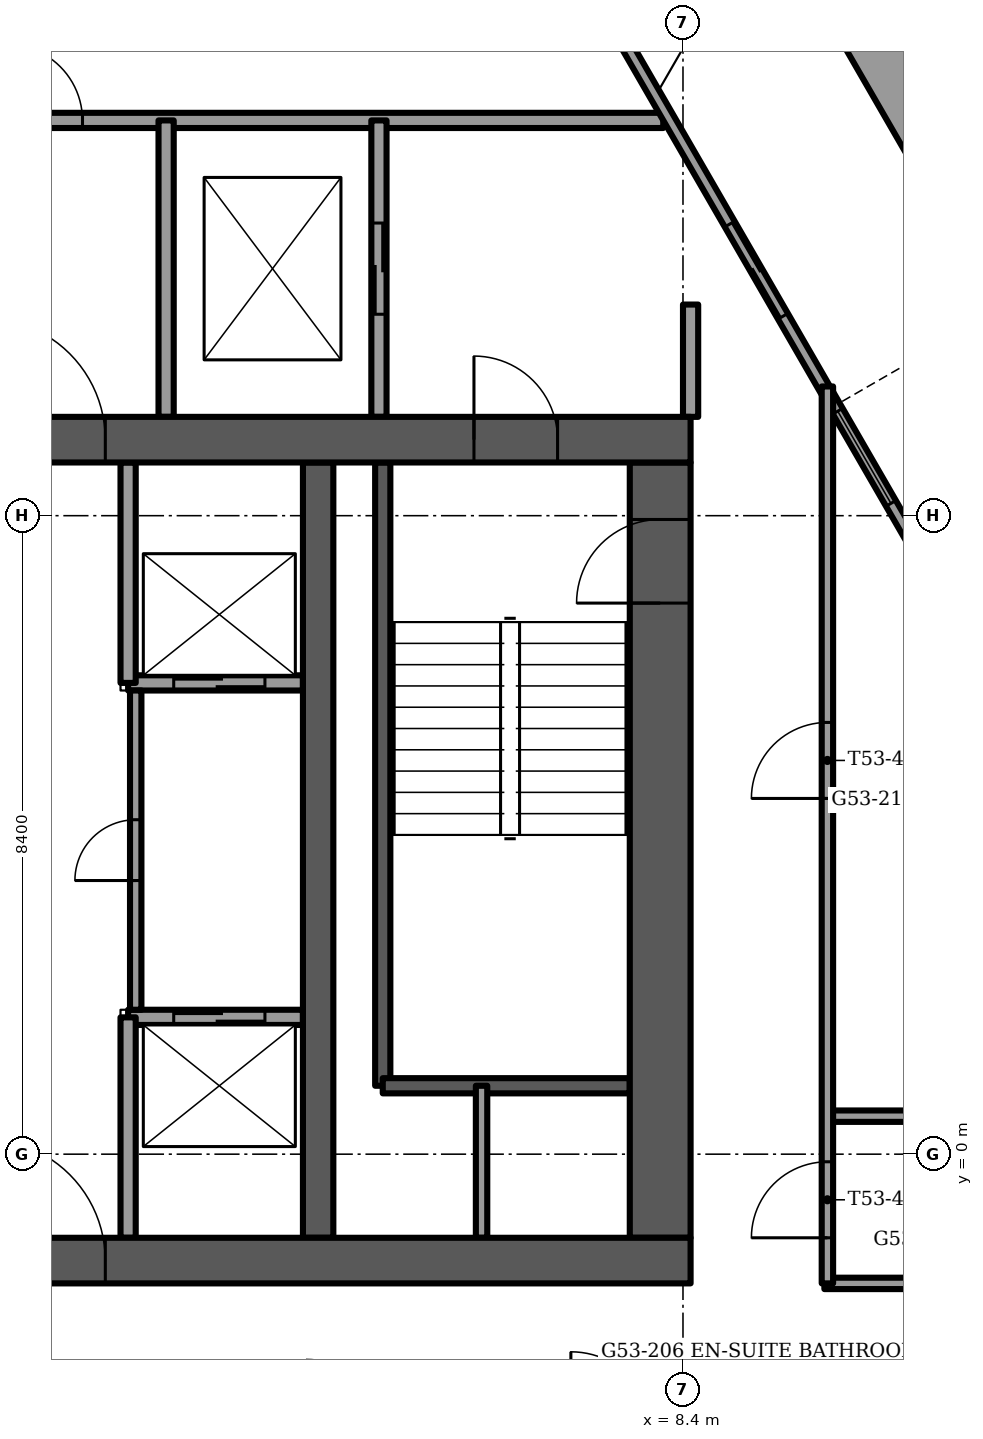
"""IFC4 building model, lengths in metres.
Left out: names, types, materials, properties, quantities, classifications, styles, units other than length and angle.
Written with IfcOpenShell. Run it as: python <this file> out.ifc"""

import sys

from ifc_helpers import new_model, si_unit, direction, frame, frame_2d, origin, place, context, subcontext, project, spatial, rectangle, extrude, element, fill, save


model = new_model("IFC4")
c1 = context("Model", 3, precision=1e-05, world=origin(), true_north=direction((0.0, 1.0)))
c2 = subcontext(c1, "Body", "Model", "MODEL_VIEW")
j1 = project(units=[si_unit("LENGTHUNIT", "METRE"), si_unit("PLANEANGLEUNIT", "RADIAN")], contexts=[c1])
p1 = place(None, origin())
s1 = spatial("IfcSite", under=j1, at=p1, CompositionType="ELEMENT")
p2 = place(p1, origin())
s2 = spatial("IfcBuilding", under=s1, at=p2, CompositionType="ELEMENT")
p3 = place(p2, frame((0.0, 0.0, 214.5)))
s3 = spatial("IfcBuildingStorey", under=s2, at=p3, CompositionType="ELEMENT", Elevation=214.5)
p4 = place(p3, frame((-8.5, -1.4, -0.3), z_axis=(0.0, 0.0, 1.0), x_axis=(1.0, 0.0, 0.0)))
e1 = element("IfcWall", 1, at=p4, inside=s3, PredefinedType="SHEAR", context=c2, shape_type="SweptSolid", body=[
    extrude(rectangle(XDim=17.0, YDim=0.6, at=frame_2d((8.5, 0.0))), origin(), (0.0, 0.0, 1.0), 3.75),
])
p5 = place(p4, frame((7.7, 0.0, 0.0)))
e2 = element("IfcOpeningElement", 2, at=p5, cuts=e1, PredefinedType="OPENING", context=c2, shape_type="SweptSolid", body=[
    extrude(rectangle(XDim=1.6, YDim=2.1, at=frame_2d((0.8, 1.05))), frame((0.0, 0.3, 0.0), z_axis=(0.0, -1.0, 0.0), x_axis=(1.0, 0.0, 0.0)), (0.0, 0.0, 1.0), 0.6),
])
p6 = place(p3, frame((-8.5, 9.4, -0.3), z_axis=(0.0, 0.0, 1.0), x_axis=(1.0, 0.0, 0.0)))
e3 = element("IfcWall", 3, at=p6, inside=s3, PredefinedType="SHEAR", context=c2, shape_type="SweptSolid", body=[
    extrude(rectangle(XDim=17.0, YDim=0.6, at=frame_2d((8.5, 0.0))), origin(), (0.0, 0.0, 1.0), 3.75),
])
p7 = place(p6, frame((7.7, 0.0, 0.0)))
e4 = element("IfcOpeningElement", 4, at=p7, cuts=e3, PredefinedType="OPENING", context=c2, shape_type="SweptSolid", body=[
    extrude(rectangle(XDim=1.6, YDim=2.1, at=frame_2d((0.8, 1.05))), frame((0.0, 0.3, 0.0), z_axis=(0.0, -1.0, 0.0), x_axis=(1.0, 0.0, 0.0)), (0.0, 0.0, 1.0), 0.6),
])
p8 = place(p6, frame((1.75, 0.0, 0.0)))
e5 = element("IfcOpeningElement", 5, at=p8, cuts=e3, PredefinedType="OPENING", context=c2, shape_type="SweptSolid", body=[
    extrude(rectangle(XDim=1.1, YDim=2.1, at=frame_2d((0.55, 1.05))), frame((0.0, 0.3, 0.0), z_axis=(0.0, -1.0, 0.0), x_axis=(1.0, 0.0, 0.0)), (0.0, 0.0, 1.0), 0.6),
])
p9 = place(p6, frame((14.15, 0.0, 0.0)))
e6 = element("IfcOpeningElement", 6, at=p9, cuts=e3, PredefinedType="OPENING", context=c2, shape_type="SweptSolid", body=[
    extrude(rectangle(XDim=1.1, YDim=2.1, at=frame_2d((0.55, 1.05))), frame((0.0, 0.3, 0.0), z_axis=(0.0, -1.0, 0.0), x_axis=(1.0, 0.0, 0.0)), (0.0, 0.0, 1.0), 0.6),
])
p10 = place(p3, frame((8.1, -1.1, -0.3), z_axis=(0.0, 0.0, 1.0), x_axis=(0.0, 1.0, 0.0)))
e7 = element("IfcWall", 7, at=p10, inside=s3, PredefinedType="SHEAR", context=c2, shape_type="SweptSolid", body=[
    extrude(rectangle(XDim=10.2, YDim=0.8, at=frame_2d((5.1, 0.0))), origin(), (0.0, 0.0, 1.0), 3.75),
])
p11 = place(p10, frame((8.35, 0.0, 0.0)))
e8 = element("IfcOpeningElement", 8, at=p11, cuts=e7, PredefinedType="OPENING", context=c2, shape_type="SweptSolid", body=[
    extrude(rectangle(XDim=1.1, YDim=2.1, at=frame_2d((0.55, 1.05))), frame((0.0, 0.4, 0.0), z_axis=(0.0, -1.0, 0.0), x_axis=(1.0, 0.0, 0.0)), (0.0, 0.0, 1.0), 0.8),
])
p12 = place(p3, frame((3.6, -1.1, -0.3), z_axis=(0.0, 0.0, 1.0), x_axis=(0.0, 1.0, 0.0)))
e9 = element("IfcWall", 9, at=p12, inside=s3, PredefinedType="SHEAR", context=c2, shape_type="SweptSolid", body=[
    extrude(rectangle(XDim=10.2, YDim=0.4, at=frame_2d((5.1, 0.0))), origin(), (0.0, 0.0, 1.0), 3.75),
])
p13 = place(p3, frame((12.718, 11.672, 0.0), z_axis=(0.0, 0.0, 1.0), x_axis=(-0.50000722722, 0.866021231107, 0.0)))
e10 = element("IfcWall", 10, at=p13, inside=s3, PredefinedType="PARAPET", context=c2, shape_type="SweptSolid", body=[
    extrude(rectangle(XDim=5.492, YDim=0.9, at=frame_2d((2.746, 0.0))), origin(), (0.0, 0.0, 1.0), 1.1),
])
p14 = place(p3, frame((8.347, -13.393, 0.0), z_axis=(0.0, 0.0, 1.0), x_axis=(0.500000919504, 0.866024872908, 0.0)))
e11 = element("IfcWall", 11, at=p14, inside=s3, PredefinedType="SOLIDWALL", context=c2, shape_type="SweptSolid", body=[
    extrude(rectangle(XDim=14.85, YDim=0.15, at=frame_2d((7.425, 0.0))), origin(), (0.0, 0.0, 1.0), 3.45),
])
p15 = place(p14, frame((3.525, 0.0, 0.15)))
e12 = element("IfcOpeningElement", 12, at=p15, cuts=e11, PredefinedType="OPENING", context=c2, shape_type="SweptSolid", body=[
    extrude(rectangle(XDim=1.5, YDim=2.85, at=frame_2d((0.75, 1.425))), frame((0.0, 0.075, 0.0), z_axis=(0.0, -1.0, 0.0), x_axis=(1.0, 0.0, 0.0)), (0.0, 0.0, 1.0), 0.15),
])
p16 = place(p14, frame((5.725, 0.0, 0.0)))
e13 = element("IfcOpeningElement", 13, at=p16, cuts=e11, PredefinedType="OPENING", context=c2, shape_type="SweptSolid", body=[
    extrude(rectangle(XDim=1.4, YDim=2.4, at=frame_2d((0.7, 1.2))), frame((0.0, 0.075, 0.0), z_axis=(0.0, -1.0, 0.0), x_axis=(1.0, 0.0, 0.0)), (0.0, 0.0, 1.0), 0.15),
])
p17 = place(p14, frame((9.078, 0.0, 0.15)))
e14 = element("IfcOpeningElement", 14, at=p17, cuts=e11, PredefinedType="OPENING", context=c2, shape_type="SweptSolid", body=[
    extrude(rectangle(XDim=1.4, YDim=2.85, at=frame_2d((0.7, 1.425))), frame((0.0, 0.075, 0.0), z_axis=(0.0, -1.0, 0.0), x_axis=(1.0, 0.0, 0.0)), (0.0, 0.0, 1.0), 0.15),
])
p18 = place(p14, frame((0.318, 0.0, 0.15)))
e15 = element("IfcOpeningElement", 15, at=p18, cuts=e11, PredefinedType="OPENING", context=c2, shape_type="SweptSolid", body=[
    extrude(rectangle(XDim=0.9, YDim=2.73, at=frame_2d((0.45, 1.365))), frame((0.0, 0.075, 0.0), z_axis=(0.0, -1.0, 0.0), x_axis=(1.0, 0.0, 0.0)), (0.0, 0.0, 1.0), 0.15),
])
p19 = place(p14, frame((12.537, 0.0, 0.15)))
e16 = element("IfcOpeningElement", 16, at=p19, cuts=e11, PredefinedType="OPENING", context=c2, shape_type="SweptSolid", body=[
    extrude(rectangle(XDim=1.5, YDim=2.73, at=frame_2d((0.75, 1.365))), frame((0.0, 0.075, 0.0), z_axis=(0.0, -1.0, 0.0), x_axis=(1.0, 0.0, 0.0)), (0.0, 0.0, 1.0), 0.15),
])
p20 = place(p3, frame((15.772, 0.532, 0.0), z_axis=(0.0, 0.0, 1.0), x_axis=(-0.49999710518, 0.866027075103, 0.0)))
e17 = element("IfcWall", 17, at=p20, inside=s3, PredefinedType="SOLIDWALL", context=c2, shape_type="SweptSolid", body=[
    extrude(rectangle(XDim=17.621, YDim=0.15, at=frame_2d((8.81, 0.0))), origin(), (0.0, 0.0, 1.0), 3.45),
])
p21 = place(p20, frame((3.525, 0.0, 0.15)))
e18 = element("IfcOpeningElement", 18, at=p21, cuts=e17, PredefinedType="OPENING", context=c2, shape_type="SweptSolid", body=[
    extrude(rectangle(XDim=1.5, YDim=2.85, at=frame_2d((0.75, 1.425))), frame((0.0, 0.075, 0.0), z_axis=(0.0, -1.0, 0.0), x_axis=(1.0, 0.0, 0.0)), (0.0, 0.0, 1.0), 0.15),
])
p22 = place(p20, frame((5.725, 0.0, 0.15)))
e19 = element("IfcOpeningElement", 19, at=p22, cuts=e17, PredefinedType="OPENING", context=c2, shape_type="SweptSolid", body=[
    extrude(rectangle(XDim=1.4, YDim=2.85, at=frame_2d((0.7, 1.425))), frame((0.0, 0.075, 0.0), z_axis=(0.0, -1.0, 0.0), x_axis=(1.0, 0.0, 0.0)), (0.0, 0.0, 1.0), 0.15),
])
p23 = place(p20, frame((7.725, 0.0, 0.15)))
e20 = element("IfcOpeningElement", 20, at=p23, cuts=e17, PredefinedType="OPENING", context=c2, shape_type="SweptSolid", body=[
    extrude(rectangle(XDim=0.9, YDim=2.85, at=frame_2d((0.45, 1.425))), frame((0.0, 0.075, 0.0), z_axis=(0.0, -1.0, 0.0), x_axis=(1.0, 0.0, 0.0)), (0.0, 0.0, 1.0), 0.15),
])
p24 = place(p20, frame((9.271, 0.0, 0.15)))
e21 = element("IfcOpeningElement", 21, at=p24, cuts=e17, PredefinedType="OPENING", context=c2, shape_type="SweptSolid", body=[
    extrude(rectangle(XDim=1.4, YDim=2.85, at=frame_2d((0.7, 1.425))), frame((0.0, 0.075, 0.0), z_axis=(0.0, -1.0, 0.0), x_axis=(1.0, 0.0, 0.0)), (0.0, 0.0, 1.0), 0.15),
])
p25 = place(p20, frame((12.114, 0.0, 0.0)))
e22 = element("IfcOpeningElement", 22, at=p25, cuts=e17, PredefinedType="OPENING", context=c2, shape_type="SweptSolid", body=[
    extrude(rectangle(XDim=1.4, YDim=2.4, at=frame_2d((0.7, 1.2))), frame((0.0, 0.075, 0.0), z_axis=(0.0, -1.0, 0.0), x_axis=(1.0, 0.0, 0.0)), (0.0, 0.0, 1.0), 0.15),
])
p26 = place(p20, frame((0.894, 0.0, 0.15)))
e23 = element("IfcOpeningElement", 23, at=p26, cuts=e17, PredefinedType="OPENING", context=c2, shape_type="SweptSolid", body=[
    extrude(rectangle(XDim=1.5, YDim=2.73, at=frame_2d((0.75, 1.365))), frame((0.0, 0.075, 0.0), z_axis=(0.0, -1.0, 0.0), x_axis=(1.0, 0.0, 0.0)), (0.0, 0.0, 1.0), 0.15),
])
p27 = place(p20, frame((16.323, 0.0, 0.15)))
e24 = element("IfcOpeningElement", 24, at=p27, cuts=e17, PredefinedType="OPENING", context=c2, shape_type="SweptSolid", body=[
    extrude(rectangle(XDim=0.9, YDim=2.73, at=frame_2d((0.45, 1.365))), frame((0.0, 0.075, 0.0), z_axis=(0.0, -1.0, 0.0), x_axis=(1.0, 0.0, 0.0)), (0.0, 0.0, 1.0), 0.15),
])
p28 = place(p3, frame((1.1, 1.8, 0.0), z_axis=(0.0, 0.0, 1.0), x_axis=(1.0, 0.0, 0.0)))
e25 = element("IfcWall", 25, at=p28, inside=s3, PredefinedType="PARTITIONING", context=c2, shape_type="SweptSolid", body=[
    extrude(rectangle(XDim=2.3, YDim=0.2, at=frame_2d((1.15, 0.0))), origin(), (0.0, 0.0, 1.0), 3.45),
])
p29 = place(p28, frame((0.6, 0.0, 0.0)))
e26 = element("IfcOpeningElement", 26, at=p29, cuts=e25, PredefinedType="OPENING", context=c2, shape_type="SweptSolid", body=[
    extrude(rectangle(XDim=1.2, YDim=2.1, at=frame_2d((0.6, 1.05))), frame((0.0, 0.1, 0.0), z_axis=(0.0, -1.0, 0.0), x_axis=(1.0, 0.0, 0.0)), (0.0, 0.0, 1.0), 0.2),
])
p30 = place(p3, frame((1.1, 6.2, 0.0), z_axis=(0.0, 0.0, 1.0), x_axis=(1.0, 0.0, 0.0)))
e27 = element("IfcWall", 27, at=p30, inside=s3, PredefinedType="PARTITIONING", context=c2, shape_type="SweptSolid", body=[
    extrude(rectangle(XDim=2.3, YDim=0.2, at=frame_2d((1.15, 0.0))), origin(), (0.0, 0.0, 1.0), 3.45),
])
p31 = place(p30, frame((0.6, 0.0, 0.0)))
e28 = element("IfcOpeningElement", 28, at=p31, cuts=e27, PredefinedType="OPENING", context=c2, shape_type="SweptSolid", body=[
    extrude(rectangle(XDim=1.2, YDim=2.1, at=frame_2d((0.6, 1.05))), frame((0.0, 0.1, 0.0), z_axis=(0.0, -1.0, 0.0), x_axis=(1.0, 0.0, 0.0)), (0.0, 0.0, 1.0), 0.2),
])
for number, where, z_axis, x_axis in (
    (29, (1.1, -1.1, 0.0), (0.0, 0.0, 1.0), (0.0, 1.0, 0.0)),
    (30, (1.1, 6.2, 0.0), (0.0, 0.0, 1.0), (0.0, 1.0, 0.0)),
):
    element("IfcWall", number, at=place(p3, frame(where, z_axis=z_axis, x_axis=x_axis)), inside=s3, PredefinedType="PARTITIONING", context=c2, shape_type="SweptSolid", body=[
        extrude(rectangle(XDim=2.9, YDim=0.2, at=frame_2d((1.45, 0.0))), origin(), (0.0, 0.0, 1.0), 3.45),
    ])
p32 = place(p3, frame((4.45, 0.9, -0.3), z_axis=(0.0, 0.0, 1.0), x_axis=(0.0, 1.0, 0.0)))
e31 = element("IfcWall", 31, at=p32, inside=s3, PredefinedType="SOLIDWALL", context=c2, shape_type="SweptSolid", body=[
    extrude(rectangle(XDim=8.2, YDim=0.2, at=frame_2d((4.1, 0.0))), origin(), (0.0, 0.0, 1.0), 3.75),
])
p33 = place(p3, frame((4.45, 0.9, -0.3), z_axis=(0.0, 0.0, 1.0), x_axis=(1.0, 0.0, 0.0)))
e32 = element("IfcWall", 32, at=p33, inside=s3, PredefinedType="SOLIDWALL", context=c2, shape_type="SweptSolid", body=[
    extrude(rectangle(XDim=3.25, YDim=0.2, at=frame_2d((1.625, 0.0))), origin(), (0.0, 0.0, 1.0), 3.75),
])
p34 = place(p3, frame((5.75, -1.1, 0.0), z_axis=(0.0, 0.0, 1.0), x_axis=(0.0, 1.0, 0.0)))
e33 = element("IfcWall", 33, at=p34, inside=s3, PredefinedType="PARTITIONING", context=c2, shape_type="SweptSolid", body=[
    extrude(rectangle(XDim=2.0, YDim=0.15, at=frame_2d((1.0, 0.0))), origin(), (0.0, 0.0, 1.0), 3.45),
])
p35 = place(p3, frame((-8.141, 13.6, 0.0), z_axis=(0.0, 0.0, 1.0), x_axis=(1.0, 0.0, 0.0)))
e34 = element("IfcWall", 34, at=p35, inside=s3, PredefinedType="PARTITIONING", context=c2, shape_type="SweptSolid", body=[
    extrude(rectangle(XDim=16.281, YDim=0.2, at=frame_2d((8.141, 0.0))), origin(), (0.0, 0.0, 1.0), 3.45),
])
p36 = place(p35, frame((7.641, 0.0, 0.0)))
e35 = element("IfcOpeningElement", 35, at=p36, cuts=e34, PredefinedType="OPENING", context=c2, shape_type="SweptSolid", body=[
    extrude(rectangle(XDim=1.0, YDim=2.1, at=frame_2d((0.5, 1.05))), frame((0.0, 0.1, 0.0), z_axis=(0.0, -1.0, 0.0), x_axis=(1.0, 0.0, 0.0)), (0.0, 0.0, 1.0), 0.2),
])
p37 = place(p3, frame((8.5, 9.7, 0.0), z_axis=(0.0, 0.0, 1.0), x_axis=(0.0, 1.0, 0.0)))
e36 = element("IfcWall", 36, at=p37, inside=s3, PredefinedType="PARTITIONING", context=c2, shape_type="SweptSolid", body=[
    extrude(rectangle(XDim=1.478, YDim=0.2, at=frame_2d((0.739, 0.0))), origin(), (0.0, 0.0, 1.0), 3.45),
])
p38 = place(p3, frame((4.4, 9.7, 0.0), z_axis=(0.0, 0.0, 1.0), x_axis=(0.0, 1.0, 0.0)))
e37 = element("IfcWall", 37, at=p38, inside=s3, PredefinedType="PARTITIONING", context=c2, shape_type="SweptSolid", body=[
    extrude(rectangle(XDim=3.9, YDim=0.2, at=frame_2d((1.95, 0.0))), origin(), (0.0, 0.0, 1.0), 3.45),
])
p39 = place(p38, frame((1.35, 0.0, 0.0)))
e38 = element("IfcOpeningElement", 38, at=p39, cuts=e37, PredefinedType="OPENING", context=c2, shape_type="SweptSolid", body=[
    extrude(rectangle(XDim=1.2, YDim=2.1, at=frame_2d((0.6, 1.05))), frame((0.0, 0.1, 0.0), z_axis=(0.0, -1.0, 0.0), x_axis=(1.0, 0.0, 0.0)), (0.0, 0.0, 1.0), 0.2),
])
p40 = place(p3, frame((1.6, 9.7, 0.0), z_axis=(0.0, 0.0, 1.0), x_axis=(0.0, 1.0, 0.0)))
e39 = element("IfcWall", 39, at=p40, inside=s3, PredefinedType="PARTITIONING", context=c2, shape_type="SweptSolid", body=[
    extrude(rectangle(XDim=3.9, YDim=0.2, at=frame_2d((1.95, 0.0))), origin(), (0.0, 0.0, 1.0), 3.45),
])
p41 = place(p3, frame((1.2, 1.9, 0.0), z_axis=(0.0, 0.0, 1.0), x_axis=(0.0, 1.0, 0.0)))
e40 = element("IfcWall", 40, at=p41, inside=s3, PredefinedType="PARTITIONING", context=c2, shape_type="SweptSolid", body=[
    extrude(rectangle(XDim=4.2, YDim=0.15, at=frame_2d((2.1, 0.0))), origin(), (0.0, 0.0, 1.0), 3.45),
])
p42 = place(p41, frame((1.7, 0.0, 0.0)))
e41 = element("IfcOpeningElement", 41, at=p42, cuts=e40, PredefinedType="OPENING", context=c2, shape_type="SweptSolid", body=[
    extrude(rectangle(XDim=0.8, YDim=2.1, at=frame_2d((0.4, 1.05))), frame((0.0, 0.075, 0.0), z_axis=(0.0, -1.0, 0.0), x_axis=(1.0, 0.0, 0.0)), (0.0, 0.0, 1.0), 0.15),
])
p43 = place(p3, frame((10.26, -1.7, 0.0), z_axis=(0.0, 0.0, 1.0), x_axis=(1.0, 0.0, 0.0)))
e42 = element("IfcWall", 42, at=p43, inside=s3, PredefinedType="PARTITIONING", context=c2, shape_type="SweptSolid", body=[
    extrude(rectangle(XDim=3.54, YDim=0.15, at=frame_2d((1.77, 0.0))), origin(), (0.0, 0.0, 1.0), 3.45),
])
p44 = place(p3, frame((10.3, 0.5, 0.0), z_axis=(0.0, 0.0, 1.0), x_axis=(1.0, 0.0, 0.0)))
e43 = element("IfcWall", 43, at=p44, inside=s3, PredefinedType="PARTITIONING", context=c2, shape_type="SweptSolid", body=[
    extrude(rectangle(XDim=5.489, YDim=0.15, at=frame_2d((2.745, 0.0))), origin(), (0.0, 0.0, 1.0), 3.45),
])
p45 = place(p3, frame((10.3, -1.7, 0.0), z_axis=(0.0, 0.0, 1.0), x_axis=(0.0, 1.0, 0.0)))
e44 = element("IfcWall", 44, at=p45, inside=s3, PredefinedType="PARTITIONING", context=c2, shape_type="SweptSolid", body=[
    extrude(rectangle(XDim=11.8, YDim=0.15, at=frame_2d((5.9, 0.0))), origin(), (0.0, 0.0, 1.0), 3.45),
])
p46 = place(p45, frame((0.6, 0.0, 0.0)))
e45 = element("IfcOpeningElement", 45, at=p46, cuts=e44, PredefinedType="OPENING", context=c2, shape_type="SweptSolid", body=[
    extrude(rectangle(XDim=1.0, YDim=2.1, at=frame_2d((0.5, 1.05))), frame((0.0, 0.075, 0.0), z_axis=(0.0, -1.0, 0.0), x_axis=(1.0, 0.0, 0.0)), (0.0, 0.0, 1.0), 0.15),
])
p47 = place(p45, frame((6.38, 0.0, 0.0)))
e46 = element("IfcOpeningElement", 46, at=p47, cuts=e44, PredefinedType="OPENING", context=c2, shape_type="SweptSolid", body=[
    extrude(rectangle(XDim=1.0, YDim=2.1, at=frame_2d((0.5, 1.05))), frame((0.0, 0.075, 0.0), z_axis=(0.0, -1.0, 0.0), x_axis=(1.0, 0.0, 0.0)), (0.0, 0.0, 1.0), 0.15),
])
p48 = place(p24, origin())
e47 = element("IfcWindow", 47, at=p48, inside=s3, PartitioningType="SINGLE_PANEL", PredefinedType="WINDOW", context=c2, shape_type="SweptSolid", body=[
    extrude(rectangle(XDim=1.4, YDim=2.85, at=frame_2d((0.7, 1.425))), frame((0.0, 0.03, 0.0), z_axis=(0.0, -1.0, 0.0), x_axis=(1.0, 0.0, 0.0)), (0.0, 0.0, 1.0), 0.06),
])
fill(e21, e47)
p49 = place(p25, origin())
e48 = element("IfcDoor", 48, at=p49, inside=s3, OperationType="SLIDING_TO_RIGHT", PredefinedType="DOOR", context=c2, shape_type="SweptSolid", body=[
    extrude(rectangle(XDim=1.4, YDim=2.4, at=frame_2d((0.7, 1.2))), frame((0.0, 0.025, 0.0), z_axis=(0.0, -1.0, 0.0), x_axis=(1.0, 0.0, 0.0)), (0.0, 0.0, 1.0), 0.05),
])
fill(e22, e48)
p50 = place(p29, origin())
e49 = element("IfcDoor", 49, at=p50, inside=s3, OperationType="SLIDING_TO_LEFT", PredefinedType="DOOR", context=c2, shape_type="SweptSolid", body=[
    extrude(rectangle(XDim=1.2, YDim=2.1, at=frame_2d((0.6, 1.05))), frame((0.0, 0.025, 0.0), z_axis=(0.0, -1.0, 0.0), x_axis=(1.0, 0.0, 0.0)), (0.0, 0.0, 1.0), 0.05),
])
fill(e26, e49)
p51 = place(p31, origin())
e50 = element("IfcDoor", 50, at=p51, inside=s3, OperationType="SLIDING_TO_LEFT", PredefinedType="DOOR", context=c2, shape_type="SweptSolid", body=[
    extrude(rectangle(XDim=1.2, YDim=2.1, at=frame_2d((0.6, 1.05))), frame((0.0, 0.025, 0.0), z_axis=(0.0, -1.0, 0.0), x_axis=(1.0, 0.0, 0.0)), (0.0, 0.0, 1.0), 0.05),
])
fill(e28, e50)
p52 = place(p5, origin())
e51 = element("IfcDoor", 51, at=p52, inside=s3, OperationType="DOUBLE_DOOR_SINGLE_SWING", PredefinedType="DOOR", context=c2, shape_type="SweptSolid", body=[
    extrude(rectangle(XDim=1.6, YDim=2.1, at=frame_2d((0.8, 1.05))), frame((0.0, 0.025, 0.0), z_axis=(0.0, -1.0, 0.0), x_axis=(1.0, 0.0, 0.0)), (0.0, 0.0, 1.0), 0.05),
])
fill(e2, e51)
p53 = place(p7, origin())
e52 = element("IfcDoor", 52, at=p53, inside=s3, OperationType="DOUBLE_DOOR_SINGLE_SWING", PredefinedType="DOOR", context=c2, shape_type="SweptSolid", body=[
    extrude(rectangle(XDim=1.6, YDim=2.1, at=frame_2d((0.8, 1.05))), frame((0.0, 0.025, 0.0), z_axis=(0.0, -1.0, 0.0), x_axis=(1.0, 0.0, 0.0)), (0.0, 0.0, 1.0), 0.05),
])
fill(e4, e52)
p54 = place(p9, origin())
e53 = element("IfcDoor", 53, at=p54, inside=s3, OperationType="SINGLE_SWING_RIGHT", PredefinedType="DOOR", context=c2, shape_type="SweptSolid", body=[
    extrude(rectangle(XDim=1.1, YDim=2.1, at=frame_2d((0.55, 1.05))), frame((0.0, 0.025, 0.0), z_axis=(0.0, -1.0, 0.0), x_axis=(1.0, 0.0, 0.0)), (0.0, 0.0, 1.0), 0.05),
])
fill(e6, e53)
p55 = place(p11, origin())
e54 = element("IfcDoor", 54, at=p55, inside=s3, OperationType="SINGLE_SWING_LEFT", PredefinedType="DOOR", context=c2, shape_type="SweptSolid", body=[
    extrude(rectangle(XDim=1.1, YDim=2.1, at=frame_2d((0.55, 1.05))), frame((0.0, 0.025, 0.0), z_axis=(0.0, -1.0, 0.0), x_axis=(1.0, 0.0, 0.0)), (0.0, 0.0, 1.0), 0.05),
])
fill(e8, e54)
p56 = place(p39, origin())
e55 = element("IfcDoor", 55, at=p56, inside=s3, OperationType="SLIDING_TO_LEFT", PredefinedType="DOOR", context=c2, shape_type="SweptSolid", body=[
    extrude(rectangle(XDim=1.2, YDim=2.1, at=frame_2d((0.6, 1.05))), frame((0.0, 0.025, 0.0), z_axis=(0.0, -1.0, 0.0), x_axis=(1.0, 0.0, 0.0)), (0.0, 0.0, 1.0), 0.05),
])
fill(e38, e55)
p57 = place(p36, origin())
e56 = element("IfcDoor", 56, at=p57, inside=s3, OperationType="SINGLE_SWING_LEFT", PredefinedType="DOOR", context=c2, shape_type="SweptSolid", body=[
    extrude(rectangle(XDim=1.0, YDim=2.1, at=frame_2d((0.5, 1.05))), frame((0.0, 0.025, 0.0), z_axis=(0.0, -1.0, 0.0), x_axis=(1.0, 0.0, 0.0)), (0.0, 0.0, 1.0), 0.05),
])
fill(e35, e56)
p58 = place(p42, origin())
e57 = element("IfcDoor", 57, at=p58, inside=s3, OperationType="SINGLE_SWING_RIGHT", PredefinedType="DOOR", context=c2, shape_type="SweptSolid", body=[
    extrude(rectangle(XDim=0.8, YDim=2.1, at=frame_2d((0.4, 1.05))), frame((0.0, 0.025, 0.0), z_axis=(0.0, -1.0, 0.0), x_axis=(1.0, 0.0, 0.0)), (0.0, 0.0, 1.0), 0.05),
])
fill(e41, e57)
p59 = place(p46, origin())
e58 = element("IfcDoor", 58, at=p59, inside=s3, OperationType="SINGLE_SWING_RIGHT", PredefinedType="DOOR", context=c2, shape_type="SweptSolid", body=[
    extrude(rectangle(XDim=1.0, YDim=2.1, at=frame_2d((0.5, 1.05))), frame((0.0, 0.025, 0.0), z_axis=(0.0, -1.0, 0.0), x_axis=(1.0, 0.0, 0.0)), (0.0, 0.0, 1.0), 0.05),
])
fill(e45, e58)
p60 = place(p47, origin())
e59 = element("IfcDoor", 59, at=p60, inside=s3, OperationType="SINGLE_SWING_LEFT", PredefinedType="DOOR", context=c2, shape_type="SweptSolid", body=[
    extrude(rectangle(XDim=1.0, YDim=2.1, at=frame_2d((0.5, 1.05))), frame((0.0, 0.025, 0.0), z_axis=(0.0, -1.0, 0.0), x_axis=(1.0, 0.0, 0.0)), (0.0, 0.0, 1.0), 0.05),
])
fill(e46, e59)
save(model, sys.argv[1])
